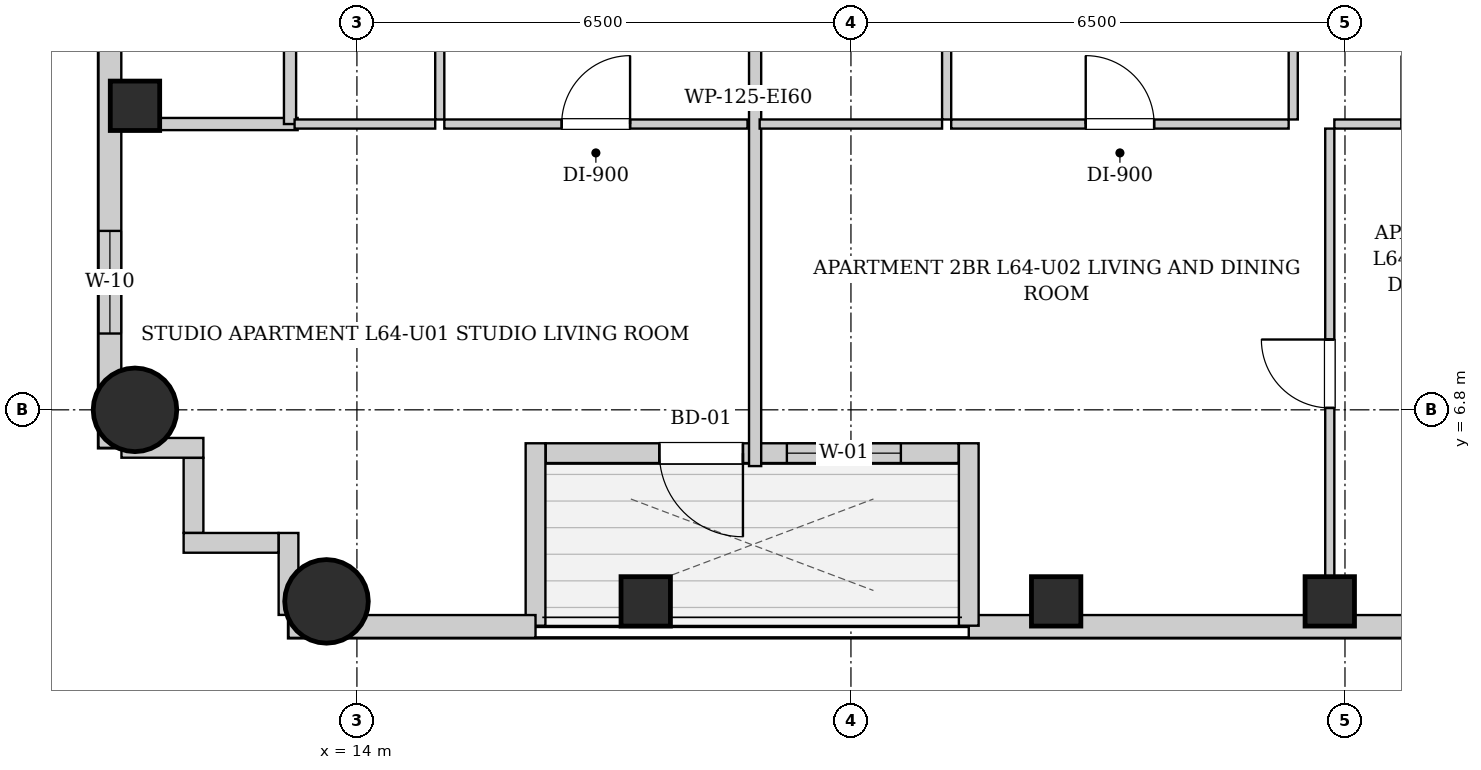
"""IFC4 building model, lengths in metres.
Left out: names, types, materials, properties, quantities, classifications, styles, units other than length and angle.
Written with IfcOpenShell. Run it as: python <this file> out.ifc"""

import sys

from ifc_helpers import new_model, si_unit, direction, frame, frame_2d, origin, origin_2d, place, context, subcontext, project, spatial, rectangle, circle, extrude, element, fill, save


model = new_model("IFC4")
c1 = context("Model", 3, precision=1e-05, world=origin(), true_north=direction((0.0, 1.0)))
c2 = subcontext(c1, "Body", "Model", "MODEL_VIEW")
j1 = project(units=[si_unit("LENGTHUNIT", "METRE"), si_unit("PLANEANGLEUNIT", "RADIAN")], contexts=[c1])
p1 = place(None, origin())
s1 = spatial("IfcSite", under=j1, at=p1, CompositionType="ELEMENT")
p2 = place(p1, origin())
s2 = spatial("IfcBuilding", under=s1, at=p2, CompositionType="ELEMENT")
p3 = place(p2, frame((0.0, 0.0, 220.7)))
s3 = spatial("IfcBuildingStorey", under=s2, at=p3, CompositionType="ELEMENT", Elevation=220.7)
p4 = place(p3, frame((13.6, 4.28, 0.0), z_axis=(0.0, 0.0, 1.0), x_axis=(1.0, 0.0, 0.0)))
e1 = element("IfcColumn", 1, at=p4, inside=s3, PredefinedType="COLUMN", context=c2, shape_type="SweptSolid", body=[
    extrude(circle(Radius=0.55, at=origin_2d()), origin(), (0.0, 0.0, 1.0), 3.4),
])
for number, where, z_axis, x_axis in (
    (2, (17.8, 4.28, 0.0), (0.0, 0.0, 1.0), (1.0, 0.0, 0.0)),
    (3, (23.2, 4.28, 0.0), (0.0, 0.0, 1.0), (1.0, 0.0, 0.0)),
    (4, (26.8, 4.28, 0.0), (0.0, 0.0, 1.0), (1.0, 0.0, 0.0)),
):
    element("IfcColumn", number, at=place(p3, frame(where, z_axis=z_axis, x_axis=x_axis)), inside=s3, PredefinedType="COLUMN", context=c2, shape_type="SweptSolid", body=[
        extrude(rectangle(XDim=0.65, YDim=0.65, at=origin_2d()), origin(), (0.0, 0.0, 1.0), 3.4),
    ])
p5 = place(p3, frame((11.08, 6.8, 0.0), z_axis=(0.0, 0.0, 1.0), x_axis=(1.0, 0.0, 0.0)))
e5 = element("IfcColumn", 5, at=p5, inside=s3, PredefinedType="COLUMN", context=c2, shape_type="SweptSolid", body=[
    extrude(circle(Radius=0.55, at=origin_2d()), origin(), (0.0, 0.0, 1.0), 3.4),
])
p6 = place(p3, frame((11.08, 10.8, 0.0), z_axis=(0.0, 0.0, 1.0), x_axis=(1.0, 0.0, 0.0)))
e6 = element("IfcColumn", 6, at=p6, inside=s3, PredefinedType="COLUMN", context=c2, shape_type="SweptSolid", body=[
    extrude(rectangle(XDim=0.65, YDim=0.65, at=origin_2d()), origin(), (0.0, 0.0, 1.0), 3.4),
])
p7 = place(p3, frame((37.8, 3.95, 0.0), z_axis=(0.0, 0.0, 1.0), x_axis=(-1.0, 0.0, 0.0)))
e7 = element("IfcWall", 7, at=p7, inside=s3, PredefinedType="SOLIDWALL", context=c2, shape_type="SweptSolid", body=[
    extrude(rectangle(XDim=15.75, YDim=0.3, at=frame_2d((7.875, 0.0))), origin(), (0.0, 0.0, 1.0), 3.14),
])
p8 = place(p7, frame((8.335, 0.0, 0.55)))
e8 = element("IfcOpeningElement", 8, at=p8, cuts=e7, PredefinedType="OPENING", context=c2, shape_type="SweptSolid", body=[
    extrude(rectangle(XDim=1.35, YDim=1.2, at=frame_2d((0.675, 0.6))), frame((0.0, 0.16, 0.0), z_axis=(0.0, -1.0, 0.0), x_axis=(1.0, 0.0, 0.0)), (0.0, 0.0, 1.0), 0.32),
])
p9 = place(p7, frame((5.085, 0.0, 0.55)))
e9 = element("IfcOpeningElement", 9, at=p9, cuts=e7, PredefinedType="OPENING", context=c2, shape_type="SweptSolid", body=[
    extrude(rectangle(XDim=1.35, YDim=1.2, at=frame_2d((0.675, 0.6))), frame((0.0, 0.16, 0.0), z_axis=(0.0, -1.0, 0.0), x_axis=(1.0, 0.0, 0.0)), (0.0, 0.0, 1.0), 0.32),
])
p10 = place(p3, frame((22.05, 3.96, 0.0), z_axis=(0.0, 0.0, 1.0), x_axis=(0.0, 1.0, 0.0)))
e10 = element("IfcWall", 10, at=p10, inside=s3, PredefinedType="SOLIDWALL", context=c2, shape_type="SweptSolid", body=[
    extrude(rectangle(XDim=2.4, YDim=0.26, at=frame_2d((1.2, 0.0))), origin(), (0.0, 0.0, 1.0), 3.14),
])
p11 = place(p3, frame((21.916, 6.23, 0.0), z_axis=(0.0, 0.0, 1.0), x_axis=(-1.0, 0.0, 0.0)))
e11 = element("IfcWall", 11, at=p11, inside=s3, PredefinedType="SOLIDWALL", context=c2, shape_type="SweptSolid", body=[
    extrude(rectangle(XDim=5.432, YDim=0.26, at=frame_2d((2.716, 0.0))), origin(), (0.0, 0.0, 1.0), 3.14),
])
p12 = place(p11, frame((2.837, 0.0, 0.0)))
e12 = element("IfcOpeningElement", 12, at=p12, cuts=e11, PredefinedType="OPENING", context=c2, shape_type="SweptSolid", body=[
    extrude(rectangle(XDim=1.1, YDim=2.0, at=frame_2d((0.55, 1.0))), frame((0.0, 0.14, 0.0), z_axis=(0.0, -1.0, 0.0), x_axis=(1.0, 0.0, 0.0)), (0.0, 0.0, 1.0), 0.28),
])
p13 = place(p11, frame((0.759, 0.0, 0.85)))
e13 = element("IfcOpeningElement", 13, at=p13, cuts=e11, PredefinedType="OPENING", context=c2, shape_type="SweptSolid", body=[
    extrude(rectangle(XDim=1.5, YDim=1.85, at=frame_2d((0.75, 0.925))), frame((0.0, 0.14, 0.0), z_axis=(0.0, -1.0, 0.0), x_axis=(1.0, 0.0, 0.0)), (0.0, 0.0, 1.0), 0.28),
])
p14 = place(p3, frame((16.35, 6.36, 0.0), z_axis=(0.0, 0.0, 1.0), x_axis=(0.0, -1.0, 0.0)))
e14 = element("IfcWall", 14, at=p14, inside=s3, PredefinedType="SOLIDWALL", context=c2, shape_type="SweptSolid", body=[
    extrude(rectangle(XDim=2.4, YDim=0.26, at=frame_2d((1.2, 0.0))), origin(), (0.0, 0.0, 1.0), 3.14),
])
p15 = place(p3, frame((16.35, 3.95, 0.0), z_axis=(0.0, 0.0, 1.0), x_axis=(-1.0, 0.0, 0.0)))
e15 = element("IfcWall", 15, at=p15, inside=s3, PredefinedType="SOLIDWALL", context=c2, shape_type="SweptSolid", body=[
    extrude(rectangle(XDim=3.25, YDim=0.3, at=frame_2d((1.625, 0.0))), origin(), (0.0, 0.0, 1.0), 3.14),
])
p16 = place(p3, frame((10.75, 6.3, 0.0), z_axis=(0.0, 0.0, 1.0), x_axis=(0.0, 1.0, 0.0)))
e16 = element("IfcWall", 16, at=p16, inside=s3, PredefinedType="SOLIDWALL", context=c2, shape_type="SweptSolid", body=[
    extrude(rectangle(XDim=31.4, YDim=0.3, at=frame_2d((15.7, 0.0))), origin(), (0.0, 0.0, 1.0), 3.14),
])
p17 = place(p16, frame((1.504, 0.0, 0.55)))
e17 = element("IfcOpeningElement", 17, at=p17, cuts=e16, PredefinedType="OPENING", context=c2, shape_type="SweptSolid", body=[
    extrude(rectangle(XDim=1.35, YDim=1.2, at=frame_2d((0.675, 0.6))), frame((0.0, 0.16, 0.0), z_axis=(0.0, -1.0, 0.0), x_axis=(1.0, 0.0, 0.0)), (0.0, 0.0, 1.0), 0.32),
])
p18 = place(p16, frame((28.546, 0.0, 0.55)))
e18 = element("IfcOpeningElement", 18, at=p18, cuts=e16, PredefinedType="OPENING", context=c2, shape_type="SweptSolid", body=[
    extrude(rectangle(XDim=1.35, YDim=1.2, at=frame_2d((0.675, 0.6))), frame((0.0, 0.16, 0.0), z_axis=(0.0, -1.0, 0.0), x_axis=(1.0, 0.0, 0.0)), (0.0, 0.0, 1.0), 0.32),
])
p19 = place(p16, frame((10.367, 0.0, 0.55)))
e19 = element("IfcOpeningElement", 19, at=p19, cuts=e16, PredefinedType="OPENING", context=c2, shape_type="SweptSolid", body=[
    extrude(rectangle(XDim=1.35, YDim=1.2, at=frame_2d((0.675, 0.6))), frame((0.0, 0.16, 0.0), z_axis=(0.0, -1.0, 0.0), x_axis=(1.0, 0.0, 0.0)), (0.0, 0.0, 1.0), 0.32),
])
p20 = place(p16, frame((19.683, 0.0, 0.55)))
e20 = element("IfcOpeningElement", 20, at=p20, cuts=e16, PredefinedType="OPENING", context=c2, shape_type="SweptSolid", body=[
    extrude(rectangle(XDim=1.35, YDim=1.2, at=frame_2d((0.675, 0.6))), frame((0.0, 0.16, 0.0), z_axis=(0.0, -1.0, 0.0), x_axis=(1.0, 0.0, 0.0)), (0.0, 0.0, 1.0), 0.32),
])
p21 = place(p3, frame((13.1, 4.102, 0.0), z_axis=(0.0, 0.0, 1.0), x_axis=(0.0, 1.0, 0.0)))
e21 = element("IfcWall", 21, at=p21, inside=s3, PredefinedType="SOLIDWALL", context=c2, shape_type="SweptSolid", body=[
    extrude(rectangle(XDim=1.078, YDim=0.26, at=frame_2d((0.539, 0.0))), origin(), (0.0, 0.0, 1.0), 3.14),
])
p22 = place(p3, frame((12.968, 5.05, 0.0), z_axis=(0.0, 0.0, 1.0), x_axis=(-1.0, 0.0, 0.0)))
e22 = element("IfcWall", 22, at=p22, inside=s3, PredefinedType="SOLIDWALL", context=c2, shape_type="SweptSolid", body=[
    extrude(rectangle(XDim=1.248, YDim=0.26, at=frame_2d((0.624, 0.0))), origin(), (0.0, 0.0, 1.0), 3.14),
])
p23 = place(p3, frame((11.85, 5.182, 0.0), z_axis=(0.0, 0.0, 1.0), x_axis=(0.0, 1.0, 0.0)))
e23 = element("IfcWall", 23, at=p23, inside=s3, PredefinedType="SOLIDWALL", context=c2, shape_type="SweptSolid", body=[
    extrude(rectangle(XDim=0.986, YDim=0.26, at=frame_2d((0.493, 0.0))), origin(), (0.0, 0.0, 1.0), 3.14),
])
p24 = place(p3, frame((11.98, 6.3, 0.0), z_axis=(0.0, 0.0, 1.0), x_axis=(-1.0, 0.0, 0.0)))
e24 = element("IfcWall", 24, at=p24, inside=s3, PredefinedType="SOLIDWALL", context=c2, shape_type="SweptSolid", body=[
    extrude(rectangle(XDim=1.078, YDim=0.26, at=frame_2d((0.539, 0.0))), origin(), (0.0, 0.0, 1.0), 3.14),
])
p25 = place(p3, frame((10.88, 10.56, 0.0), z_axis=(0.0, 0.0, 1.0), x_axis=(1.0, 0.0, 0.0)))
e25 = element("IfcWall", 25, at=p25, inside=s3, PredefinedType="PARTITIONING", context=c2, shape_type="SweptSolid", body=[
    extrude(rectangle(XDim=2.34, YDim=0.16, at=frame_2d((1.17, 0.0))), origin(), (0.0, 0.0, 1.0), 3.14),
])
p26 = place(p3, frame((13.12, 10.56, 0.0), z_axis=(0.0, 0.0, 1.0), x_axis=(0.0, 1.0, 0.0)))
e26 = element("IfcWall", 26, at=p26, inside=s3, PredefinedType="PARTITIONING", context=c2, shape_type="SweptSolid", body=[
    extrude(rectangle(XDim=2.91, YDim=0.16, at=frame_2d((1.455, 0.0))), origin(), (0.0, 0.0, 1.0), 3.14),
])
p27 = place(p3, frame((15.09, 10.62, 0.0), z_axis=(0.0, 0.0, 1.0), x_axis=(0.0, 1.0, 0.0)))
e27 = element("IfcWall", 27, at=p27, inside=s3, PredefinedType="PARTITIONING", context=c2, shape_type="SweptSolid", body=[
    extrude(rectangle(XDim=2.85, YDim=0.12, at=frame_2d((1.425, 0.0))), origin(), (0.0, 0.0, 1.0), 3.14),
])
p28 = place(p27, frame((0.995, 0.0, 0.0)))
e28 = element("IfcOpeningElement", 28, at=p28, cuts=e27, PredefinedType="OPENING", context=c2, shape_type="SweptSolid", body=[
    extrude(rectangle(XDim=0.86, YDim=2.05, at=frame_2d((0.43, 1.025))), frame((0.0, 0.07, 0.0), z_axis=(0.0, -1.0, 0.0), x_axis=(1.0, 0.0, 0.0)), (0.0, 0.0, 1.0), 0.14),
])
p29 = place(p3, frame((13.18, 10.56, 0.0), z_axis=(0.0, 0.0, 1.0), x_axis=(1.0, 0.0, 0.0)))
e29 = element("IfcWall", 29, at=p29, inside=s3, PredefinedType="PARTITIONING", context=c2, shape_type="SweptSolid", body=[
    extrude(rectangle(XDim=1.85, YDim=0.12, at=frame_2d((0.925, 0.0))), origin(), (0.0, 0.0, 1.0), 3.14),
])
p30 = place(p3, frame((15.15, 10.56, 0.0), z_axis=(0.0, 0.0, 1.0), x_axis=(1.0, 0.0, 0.0)))
e30 = element("IfcWall", 30, at=p30, inside=s3, PredefinedType="PARTITIONING", context=c2, shape_type="SweptSolid", body=[
    extrude(rectangle(XDim=3.989, YDim=0.12, at=frame_2d((1.995, 0.0))), origin(), (0.0, 0.0, 1.0), 3.14),
])
p31 = place(p30, frame((1.544, 0.0, 0.0)))
e31 = element("IfcOpeningElement", 31, at=p31, cuts=e30, PredefinedType="OPENING", context=c2, shape_type="SweptSolid", body=[
    extrude(rectangle(XDim=0.9, YDim=2.05, at=frame_2d((0.45, 1.025))), frame((0.0, 0.07, 0.0), z_axis=(0.0, -1.0, 0.0), x_axis=(1.0, 0.0, 0.0)), (0.0, 0.0, 1.0), 0.14),
])
p32 = place(p3, frame((19.239, 6.06, 0.0), z_axis=(0.0, 0.0, 1.0), x_axis=(0.0, 1.0, 0.0)))
e32 = element("IfcWall", 32, at=p32, inside=s3, PredefinedType="PARTITIONING", context=c2, shape_type="SweptSolid", body=[
    extrude(rectangle(XDim=7.41, YDim=0.16, at=frame_2d((3.705, 0.0))), origin(), (0.0, 0.0, 1.0), 3.14),
])
p33 = place(p3, frame((21.759, 10.62, 0.0), z_axis=(0.0, 0.0, 1.0), x_axis=(0.0, 1.0, 0.0)))
e33 = element("IfcWall", 33, at=p33, inside=s3, PredefinedType="PARTITIONING", context=c2, shape_type="SweptSolid", body=[
    extrude(rectangle(XDim=2.85, YDim=0.12, at=frame_2d((1.425, 0.0))), origin(), (0.0, 0.0, 1.0), 3.14),
])
p34 = place(p33, frame((0.995, 0.0, 0.0)))
e34 = element("IfcOpeningElement", 34, at=p34, cuts=e33, PredefinedType="OPENING", context=c2, shape_type="SweptSolid", body=[
    extrude(rectangle(XDim=0.86, YDim=2.05, at=frame_2d((0.43, 1.025))), frame((0.0, 0.07, 0.0), z_axis=(0.0, -1.0, 0.0), x_axis=(1.0, 0.0, 0.0)), (0.0, 0.0, 1.0), 0.14),
])
p35 = place(p3, frame((19.299, 10.56, 0.0), z_axis=(0.0, 0.0, 1.0), x_axis=(1.0, 0.0, 0.0)))
e35 = element("IfcWall", 35, at=p35, inside=s3, PredefinedType="PARTITIONING", context=c2, shape_type="SweptSolid", body=[
    extrude(rectangle(XDim=2.4, YDim=0.12, at=frame_2d((1.2, 0.0))), origin(), (0.0, 0.0, 1.0), 3.14),
])
p36 = place(p3, frame((26.319, 10.62, 0.0), z_axis=(0.0, 0.0, 1.0), x_axis=(0.0, 1.0, 0.0)))
e36 = element("IfcWall", 36, at=p36, inside=s3, PredefinedType="PARTITIONING", context=c2, shape_type="SweptSolid", body=[
    extrude(rectangle(XDim=2.85, YDim=0.12, at=frame_2d((1.425, 0.0))), origin(), (0.0, 0.0, 1.0), 3.14),
])
p37 = place(p36, frame((0.975, 0.0, 0.0)))
e37 = element("IfcOpeningElement", 37, at=p37, cuts=e36, PredefinedType="OPENING", context=c2, shape_type="SweptSolid", body=[
    extrude(rectangle(XDim=0.9, YDim=2.05, at=frame_2d((0.45, 1.025))), frame((0.0, 0.07, 0.0), z_axis=(0.0, -1.0, 0.0), x_axis=(1.0, 0.0, 0.0)), (0.0, 0.0, 1.0), 0.14),
])
p38 = place(p3, frame((21.819, 10.56, 0.0), z_axis=(0.0, 0.0, 1.0), x_axis=(1.0, 0.0, 0.0)))
e38 = element("IfcWall", 38, at=p38, inside=s3, PredefinedType="PARTITIONING", context=c2, shape_type="SweptSolid", body=[
    extrude(rectangle(XDim=4.44, YDim=0.12, at=frame_2d((2.22, 0.0))), origin(), (0.0, 0.0, 1.0), 3.14),
])
p39 = place(p38, frame((1.77, 0.0, 0.0)))
e39 = element("IfcOpeningElement", 39, at=p39, cuts=e38, PredefinedType="OPENING", context=c2, shape_type="SweptSolid", body=[
    extrude(rectangle(XDim=0.9, YDim=2.05, at=frame_2d((0.45, 1.025))), frame((0.0, 0.07, 0.0), z_axis=(0.0, -1.0, 0.0), x_axis=(1.0, 0.0, 0.0)), (0.0, 0.0, 1.0), 0.14),
])
p40 = place(p3, frame((26.86, 10.56, 0.0), z_axis=(0.0, 0.0, 1.0), x_axis=(1.0, 0.0, 0.0)))
e40 = element("IfcWall", 40, at=p40, inside=s3, PredefinedType="PARTITIONING", context=c2, shape_type="SweptSolid", body=[
    extrude(rectangle(XDim=2.669, YDim=0.12, at=frame_2d((1.334, 0.0))), origin(), (0.0, 0.0, 1.0), 3.14),
])
p41 = place(p40, frame((0.884, 0.0, 0.0)))
e41 = element("IfcOpeningElement", 41, at=p41, cuts=e40, PredefinedType="OPENING", context=c2, shape_type="SweptSolid", body=[
    extrude(rectangle(XDim=0.9, YDim=2.05, at=frame_2d((0.45, 1.025))), frame((0.0, 0.07, 0.0), z_axis=(0.0, -1.0, 0.0), x_axis=(1.0, 0.0, 0.0)), (0.0, 0.0, 1.0), 0.14),
])
p42 = place(p3, frame((26.8, 4.08, 0.0), z_axis=(0.0, 0.0, 1.0), x_axis=(0.0, 1.0, 0.0)))
e42 = element("IfcWall", 42, at=p42, inside=s3, PredefinedType="PARTITIONING", context=c2, shape_type="SweptSolid", body=[
    extrude(rectangle(XDim=6.42, YDim=0.12, at=frame_2d((3.21, 0.0))), origin(), (0.0, 0.0, 1.0), 3.14),
])
p43 = place(p42, frame((2.745, 0.0, 0.0)))
e43 = element("IfcOpeningElement", 43, at=p43, cuts=e42, PredefinedType="OPENING", context=c2, shape_type="SweptSolid", body=[
    extrude(rectangle(XDim=0.9, YDim=2.05, at=frame_2d((0.45, 1.025))), frame((0.0, 0.07, 0.0), z_axis=(0.0, -1.0, 0.0), x_axis=(1.0, 0.0, 0.0)), (0.0, 0.0, 1.0), 0.14),
])
p44 = place(p31, origin())
e44 = element("IfcDoor", 44, at=p44, inside=s3, OperationType="SINGLE_SWING_RIGHT", PredefinedType="DOOR", context=c2, shape_type="SweptSolid", body=[
    extrude(rectangle(XDim=0.9, YDim=2.05, at=frame_2d((0.45, 1.025))), frame((0.0, 0.025, 0.0), z_axis=(0.0, -1.0, 0.0), x_axis=(1.0, 0.0, 0.0)), (0.0, 0.0, 1.0), 0.05),
])
fill(e31, e44)
p45 = place(p39, origin())
e45 = element("IfcDoor", 45, at=p45, inside=s3, OperationType="SINGLE_SWING_LEFT", PredefinedType="DOOR", context=c2, shape_type="SweptSolid", body=[
    extrude(rectangle(XDim=0.9, YDim=2.05, at=frame_2d((0.45, 1.025))), frame((0.0, 0.025, 0.0), z_axis=(0.0, -1.0, 0.0), x_axis=(1.0, 0.0, 0.0)), (0.0, 0.0, 1.0), 0.05),
])
fill(e39, e45)
p46 = place(p43, origin())
e46 = element("IfcDoor", 46, at=p46, inside=s3, OperationType="SINGLE_SWING_RIGHT", PredefinedType="DOOR", context=c2, shape_type="SweptSolid", body=[
    extrude(rectangle(XDim=0.9, YDim=2.05, at=frame_2d((0.45, 1.025))), frame((0.0, 0.025, 0.0), z_axis=(0.0, -1.0, 0.0), x_axis=(1.0, 0.0, 0.0)), (0.0, 0.0, 1.0), 0.05),
])
fill(e43, e46)
p47 = place(p12, origin())
e47 = element("IfcDoor", 47, at=p47, inside=s3, OperationType="SINGLE_SWING_LEFT", PredefinedType="DOOR", context=c2, shape_type="SweptSolid", body=[
    extrude(rectangle(XDim=1.1, YDim=2.0, at=frame_2d((0.55, 1.0))), frame((0.0, 0.025, 0.0), z_axis=(0.0, -1.0, 0.0), x_axis=(1.0, 0.0, 0.0)), (0.0, 0.0, 1.0), 0.05),
])
fill(e12, e47)
p48 = place(p17, origin())
e48 = element("IfcWindow", 48, at=p48, inside=s3, PartitioningType="SINGLE_PANEL", PredefinedType="WINDOW", context=c2, shape_type="SweptSolid", body=[
    extrude(rectangle(XDim=1.35, YDim=1.2, at=frame_2d((0.675, 0.6))), frame((0.0, 0.03, 0.0), z_axis=(0.0, -1.0, 0.0), x_axis=(1.0, 0.0, 0.0)), (0.0, 0.0, 1.0), 0.06),
])
fill(e17, e48)
p49 = place(p13, origin())
e49 = element("IfcWindow", 49, at=p49, inside=s3, PartitioningType="SINGLE_PANEL", PredefinedType="WINDOW", context=c2, shape_type="SweptSolid", body=[
    extrude(rectangle(XDim=1.5, YDim=1.85, at=frame_2d((0.75, 0.925))), frame((0.0, 0.03, 0.0), z_axis=(0.0, -1.0, 0.0), x_axis=(1.0, 0.0, 0.0)), (0.0, 0.0, 1.0), 0.06),
])
fill(e13, e49)
save(model, sys.argv[1])
